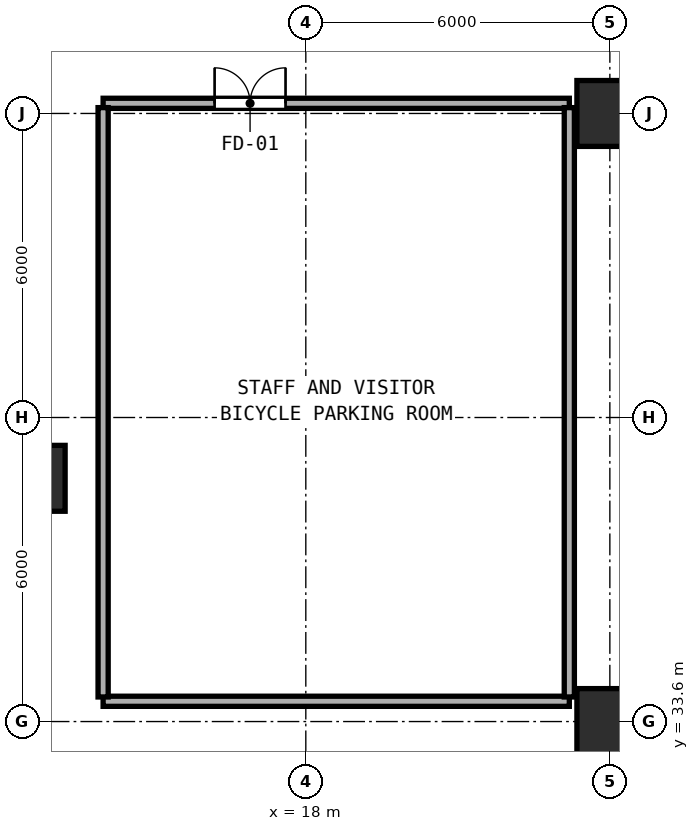
"""IFC4 building model, lengths in metres.
Left out: names, types, materials, properties, quantities, classifications, styles, units other than length and angle.
Written with IfcOpenShell. Run it as: python <this file> out.ifc"""

import sys

from ifc_helpers import new_model, si_unit, direction, frame, frame_2d, origin, origin_2d, place, context, subcontext, project, spatial, rectangle, hollow_rectangle, extrude, element, fill, save


model = new_model("IFC4")
c1 = context("Model", 3, precision=1e-05, world=origin(), true_north=direction((0.0, 1.0)))
c2 = subcontext(c1, "Body", "Model", "MODEL_VIEW")
j1 = project(units=[si_unit("LENGTHUNIT", "METRE"), si_unit("PLANEANGLEUNIT", "RADIAN")], contexts=[c1])
p1 = place(None, origin())
s1 = spatial("IfcSite", under=j1, at=p1, CompositionType="ELEMENT")
p2 = place(p1, origin())
s2 = spatial("IfcBuilding", under=s1, at=p2, CompositionType="ELEMENT")
p3 = place(p2, frame((0.0, 0.0, -4.8)))
s3 = spatial("IfcBuildingStorey", under=s2, at=p3, CompositionType="ELEMENT", Elevation=-4.8)
for number, where, z_axis, x_axis in (
    (1, (24.0, 33.6, 0.0), (0.0, 0.0, 1.0), (1.0, 0.0, 0.0)),
    (2, (24.0, 45.6, 0.0), (0.0, 0.0, 1.0), (1.0, 0.0, 0.0)),
    (3, (12.6, 38.4, 0.0), (0.0, 0.0, 1.0), (1.0, 0.0, 0.0)),
):
    element("IfcColumn", number, at=place(p3, frame(where, z_axis=z_axis, x_axis=x_axis)), inside=s3, PredefinedType="COLUMN", context=c2, shape_type="SweptSolid", body=[
        extrude(hollow_rectangle(XDim=1.3, YDim=1.3, WallThickness=0.048, at=origin_2d()), origin(), (0.0, 0.0, 1.0), 4.8),
    ])
p4 = place(p3, frame((14.0, 45.8, 0.0), z_axis=(0.0, 0.0, 1.0), x_axis=(1.0, 0.0, 0.0)))
e4 = element("IfcWall", 4, at=p4, inside=s3, PredefinedType="SOLIDWALL", context=c2, shape_type="SweptSolid", body=[
    extrude(rectangle(XDim=9.2, YDim=0.2, at=frame_2d((4.6, 0.0))), origin(), (0.0, 0.0, 1.0), 4.5),
])
p5 = place(p4, frame((2.2, 0.0, 0.0)))
e5 = element("IfcOpeningElement", 5, at=p5, cuts=e4, PredefinedType="OPENING", context=c2, shape_type="SweptSolid", body=[
    extrude(rectangle(XDim=1.4, YDim=2.2, at=frame_2d((0.7, 1.1))), frame((0.0, 0.11, 0.0), z_axis=(0.0, -1.0, 0.0), x_axis=(1.0, 0.0, 0.0)), (0.0, 0.0, 1.0), 0.22),
])
p6 = place(p3, frame((14.0, 34.0, 0.0), z_axis=(0.0, 0.0, 1.0), x_axis=(1.0, 0.0, 0.0)))
e6 = element("IfcWall", 6, at=p6, inside=s3, PredefinedType="SOLIDWALL", context=c2, shape_type="SweptSolid", body=[
    extrude(rectangle(XDim=9.2, YDim=0.2, at=frame_2d((4.6, 0.0))), origin(), (0.0, 0.0, 1.0), 4.5),
])
for number, where, z_axis, x_axis in (
    (7, (14.0, 34.085, 0.0), (0.0, 0.0, 1.0), (0.0, 1.0, 0.0)),
    (8, (23.2, 34.085, 0.0), (0.0, 0.0, 1.0), (0.0, 1.0, 0.0)),
):
    element("IfcWall", number, at=place(p3, frame(where, z_axis=z_axis, x_axis=x_axis)), inside=s3, PredefinedType="SOLIDWALL", context=c2, shape_type="SweptSolid", body=[
        extrude(rectangle(XDim=11.63, YDim=0.2, at=frame_2d((5.815, 0.0))), origin(), (0.0, 0.0, 1.0), 4.5),
    ])
p7 = place(p5, origin())
e9 = element("IfcDoor", 9, at=p7, inside=s3, OperationType="DOUBLE_DOOR_SINGLE_SWING", PredefinedType="DOOR", context=c2, shape_type="SweptSolid", body=[
    extrude(rectangle(XDim=1.4, YDim=2.2, at=frame_2d((0.7, 1.1))), frame((0.0, 0.025, 0.0), z_axis=(0.0, -1.0, 0.0), x_axis=(1.0, 0.0, 0.0)), (0.0, 0.0, 1.0), 0.05),
])
fill(e5, e9)
save(model, sys.argv[1])
